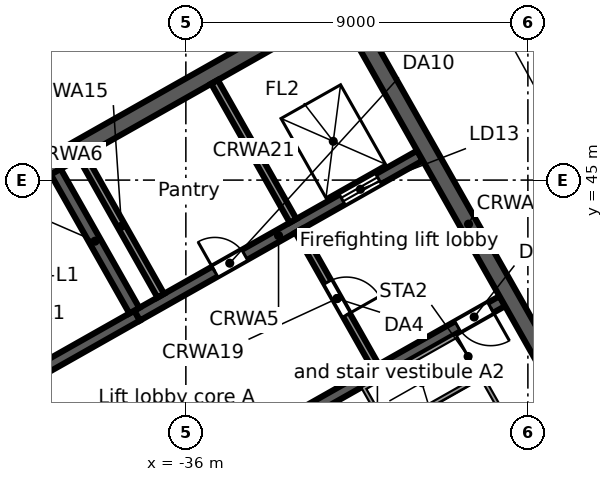
"""IFC4 building model, lengths in metres.
Left out: names, types, materials, properties, quantities, classifications, styles, units other than length and angle.
Written with IfcOpenShell. Run it as: python <this file> out.ifc"""

import sys

from ifc_helpers import new_model, si_unit, direction, frame, frame_2d, origin, place, context, subcontext, project, spatial, rectangle, extrude, element, fill, save


model = new_model("IFC4")
c1 = context("Model", 3, precision=1e-05, world=origin(), true_north=direction((0.0, 1.0)))
c2 = subcontext(c1, "Body", "Model", "MODEL_VIEW")
j1 = project(units=[si_unit("LENGTHUNIT", "METRE"), si_unit("PLANEANGLEUNIT", "RADIAN")], contexts=[c1])
p1 = place(None, origin())
s1 = spatial("IfcSite", under=j1, at=p1, CompositionType="ELEMENT")
p2 = place(p1, origin())
s2 = spatial("IfcBuilding", under=s1, at=p2, CompositionType="ELEMENT")
p3 = place(p2, frame((0.0, 0.0, 254.3)))
s3 = spatial("IfcBuildingStorey", under=s2, at=p3, CompositionType="ELEMENT", Elevation=254.3)
p4 = place(p3, frame((-0.046, 47.974, 0.0), z_axis=(0.0, 0.0, 1.0), x_axis=(-0.870356579543, -0.492421998337, 0.0)))
e1 = element("IfcWall", 1, at=p4, inside=s3, PredefinedType="STANDARD", context=c2, shape_type="SweptSolid", body=[
    extrude(rectangle(XDim=43.754, YDim=0.25, at=frame_2d((21.877, 0.0))), origin(), (0.0, 0.0, 1.0), 3.55),
])
p5 = place(p4, frame((41.061, 0.0, 0.8)))
e2 = element("IfcOpeningElement", 2, at=p5, cuts=e1, PredefinedType="OPENING", context=c2, shape_type="SweptSolid", body=[
    extrude(rectangle(XDim=2.4, YDim=2.2, at=frame_2d((1.2, 1.1))), frame((0.0, 0.135, 0.0), z_axis=(0.0, -1.0, 0.0), x_axis=(1.0, 0.0, 0.0)), (0.0, 0.0, 1.0), 0.27),
])
p6 = place(p4, frame((38.443, 0.0, 0.0)))
e3 = element("IfcOpeningElement", 3, at=p6, cuts=e1, PredefinedType="OPENING", context=c2, shape_type="SweptSolid", body=[
    extrude(rectangle(XDim=1.8, YDim=2.4, at=frame_2d((0.9, 1.2))), frame((0.0, 0.135, 0.0), z_axis=(0.0, -1.0, 0.0), x_axis=(1.0, 0.0, 0.0)), (0.0, 0.0, 1.0), 0.27),
])
p7 = place(p4, frame((35.225, 0.0, 0.8)))
e4 = element("IfcOpeningElement", 4, at=p7, cuts=e1, PredefinedType="OPENING", context=c2, shape_type="SweptSolid", body=[
    extrude(rectangle(XDim=2.4, YDim=2.2, at=frame_2d((1.2, 1.1))), frame((0.0, 0.135, 0.0), z_axis=(0.0, -1.0, 0.0), x_axis=(1.0, 0.0, 0.0)), (0.0, 0.0, 1.0), 0.27),
])
p8 = place(p4, frame((32.307, 0.0, 0.8)))
e5 = element("IfcOpeningElement", 5, at=p8, cuts=e1, PredefinedType="OPENING", context=c2, shape_type="SweptSolid", body=[
    extrude(rectangle(XDim=2.4, YDim=2.2, at=frame_2d((1.2, 1.1))), frame((0.0, 0.135, 0.0), z_axis=(0.0, -1.0, 0.0), x_axis=(1.0, 0.0, 0.0)), (0.0, 0.0, 1.0), 0.27),
])
p9 = place(p4, frame((29.688, 0.0, 0.0)))
e6 = element("IfcOpeningElement", 6, at=p9, cuts=e1, PredefinedType="OPENING", context=c2, shape_type="SweptSolid", body=[
    extrude(rectangle(XDim=1.8, YDim=2.4, at=frame_2d((0.9, 1.2))), frame((0.0, 0.135, 0.0), z_axis=(0.0, -1.0, 0.0), x_axis=(1.0, 0.0, 0.0)), (0.0, 0.0, 1.0), 0.27),
])
p10 = place(p4, frame((26.47, 0.0, 0.8)))
e7 = element("IfcOpeningElement", 7, at=p10, cuts=e1, PredefinedType="OPENING", context=c2, shape_type="SweptSolid", body=[
    extrude(rectangle(XDim=2.4, YDim=2.2, at=frame_2d((1.2, 1.1))), frame((0.0, 0.135, 0.0), z_axis=(0.0, -1.0, 0.0), x_axis=(1.0, 0.0, 0.0)), (0.0, 0.0, 1.0), 0.27),
])
p11 = place(p4, frame((23.552, 0.0, 0.8)))
e8 = element("IfcOpeningElement", 8, at=p11, cuts=e1, PredefinedType="OPENING", context=c2, shape_type="SweptSolid", body=[
    extrude(rectangle(XDim=2.4, YDim=2.2, at=frame_2d((1.2, 1.1))), frame((0.0, 0.135, 0.0), z_axis=(0.0, -1.0, 0.0), x_axis=(1.0, 0.0, 0.0)), (0.0, 0.0, 1.0), 0.27),
])
p12 = place(p4, frame((20.934, 0.0, 0.0)))
e9 = element("IfcOpeningElement", 9, at=p12, cuts=e1, PredefinedType="OPENING", context=c2, shape_type="SweptSolid", body=[
    extrude(rectangle(XDim=1.8, YDim=2.4, at=frame_2d((0.9, 1.2))), frame((0.0, 0.135, 0.0), z_axis=(0.0, -1.0, 0.0), x_axis=(1.0, 0.0, 0.0)), (0.0, 0.0, 1.0), 0.27),
])
p13 = place(p4, frame((17.716, 0.0, 0.8)))
e10 = element("IfcOpeningElement", 10, at=p13, cuts=e1, PredefinedType="OPENING", context=c2, shape_type="SweptSolid", body=[
    extrude(rectangle(XDim=2.4, YDim=2.2, at=frame_2d((1.2, 1.1))), frame((0.0, 0.135, 0.0), z_axis=(0.0, -1.0, 0.0), x_axis=(1.0, 0.0, 0.0)), (0.0, 0.0, 1.0), 0.27),
])
p14 = place(p4, frame((14.798, 0.0, 0.8)))
e11 = element("IfcOpeningElement", 11, at=p14, cuts=e1, PredefinedType="OPENING", context=c2, shape_type="SweptSolid", body=[
    extrude(rectangle(XDim=2.4, YDim=2.2, at=frame_2d((1.2, 1.1))), frame((0.0, 0.135, 0.0), z_axis=(0.0, -1.0, 0.0), x_axis=(1.0, 0.0, 0.0)), (0.0, 0.0, 1.0), 0.27),
])
p15 = place(p4, frame((12.179, 0.0, 0.0)))
e12 = element("IfcOpeningElement", 12, at=p15, cuts=e1, PredefinedType="OPENING", context=c2, shape_type="SweptSolid", body=[
    extrude(rectangle(XDim=1.8, YDim=2.4, at=frame_2d((0.9, 1.2))), frame((0.0, 0.135, 0.0), z_axis=(0.0, -1.0, 0.0), x_axis=(1.0, 0.0, 0.0)), (0.0, 0.0, 1.0), 0.27),
])
p16 = place(p4, frame((8.961, 0.0, 0.8)))
e13 = element("IfcOpeningElement", 13, at=p16, cuts=e1, PredefinedType="OPENING", context=c2, shape_type="SweptSolid", body=[
    extrude(rectangle(XDim=2.4, YDim=2.2, at=frame_2d((1.2, 1.1))), frame((0.0, 0.135, 0.0), z_axis=(0.0, -1.0, 0.0), x_axis=(1.0, 0.0, 0.0)), (0.0, 0.0, 1.0), 0.27),
])
p17 = place(p4, frame((6.043, 0.0, 0.8)))
e14 = element("IfcOpeningElement", 14, at=p17, cuts=e1, PredefinedType="OPENING", context=c2, shape_type="SweptSolid", body=[
    extrude(rectangle(XDim=2.4, YDim=2.2, at=frame_2d((1.2, 1.1))), frame((0.0, 0.135, 0.0), z_axis=(0.0, -1.0, 0.0), x_axis=(1.0, 0.0, 0.0)), (0.0, 0.0, 1.0), 0.27),
])
p18 = place(p4, frame((3.425, 0.0, 0.0)))
e15 = element("IfcOpeningElement", 15, at=p18, cuts=e1, PredefinedType="OPENING", context=c2, shape_type="SweptSolid", body=[
    extrude(rectangle(XDim=1.8, YDim=2.4, at=frame_2d((0.9, 1.2))), frame((0.0, 0.135, 0.0), z_axis=(0.0, -1.0, 0.0), x_axis=(1.0, 0.0, 0.0)), (0.0, 0.0, 1.0), 0.27),
])
p19 = place(p4, frame((0.207, 0.0, 0.8)))
e16 = element("IfcOpeningElement", 16, at=p19, cuts=e1, PredefinedType="OPENING", context=c2, shape_type="SweptSolid", body=[
    extrude(rectangle(XDim=2.4, YDim=2.2, at=frame_2d((1.2, 1.1))), frame((0.0, 0.135, 0.0), z_axis=(0.0, -1.0, 0.0), x_axis=(1.0, 0.0, 0.0)), (0.0, 0.0, 1.0), 0.27),
])
p20 = place(p3, frame((-58.732, 38.771, 0.0), z_axis=(0.0, 0.0, 1.0), x_axis=(0.870354824205, 0.492425100887, 0.0)))
e17 = element("IfcWall", 17, at=p20, inside=s3, PredefinedType="STANDARD", context=c2, shape_type="SweptSolid", body=[
    extrude(rectangle(XDim=64.006, YDim=0.25, at=frame_2d((32.003, 0.0))), origin(), (0.0, 0.0, 1.0), 3.55),
])
p21 = place(p20, frame((61.259, 0.0, 0.8)))
e18 = element("IfcOpeningElement", 18, at=p21, cuts=e17, PredefinedType="OPENING", context=c2, shape_type="SweptSolid", body=[
    extrude(rectangle(XDim=2.4, YDim=2.2, at=frame_2d((1.2, 1.1))), frame((0.0, 0.135, 0.0), z_axis=(0.0, -1.0, 0.0), x_axis=(1.0, 0.0, 0.0)), (0.0, 0.0, 1.0), 0.27),
])
p22 = place(p20, frame((58.216, 0.0, 0.8)))
e19 = element("IfcOpeningElement", 19, at=p22, cuts=e17, PredefinedType="OPENING", context=c2, shape_type="SweptSolid", body=[
    extrude(rectangle(XDim=2.4, YDim=2.2, at=frame_2d((1.2, 1.1))), frame((0.0, 0.135, 0.0), z_axis=(0.0, -1.0, 0.0), x_axis=(1.0, 0.0, 0.0)), (0.0, 0.0, 1.0), 0.27),
])
p23 = place(p20, frame((55.173, 0.0, 0.8)))
e20 = element("IfcOpeningElement", 20, at=p23, cuts=e17, PredefinedType="OPENING", context=c2, shape_type="SweptSolid", body=[
    extrude(rectangle(XDim=2.4, YDim=2.2, at=frame_2d((1.2, 1.1))), frame((0.0, 0.135, 0.0), z_axis=(0.0, -1.0, 0.0), x_axis=(1.0, 0.0, 0.0)), (0.0, 0.0, 1.0), 0.27),
])
p24 = place(p20, frame((52.129, 0.0, 0.8)))
e21 = element("IfcOpeningElement", 21, at=p24, cuts=e17, PredefinedType="OPENING", context=c2, shape_type="SweptSolid", body=[
    extrude(rectangle(XDim=2.4, YDim=2.2, at=frame_2d((1.2, 1.1))), frame((0.0, 0.135, 0.0), z_axis=(0.0, -1.0, 0.0), x_axis=(1.0, 0.0, 0.0)), (0.0, 0.0, 1.0), 0.27),
])
p25 = place(p20, frame((49.086, 0.0, 0.8)))
e22 = element("IfcOpeningElement", 22, at=p25, cuts=e17, PredefinedType="OPENING", context=c2, shape_type="SweptSolid", body=[
    extrude(rectangle(XDim=2.4, YDim=2.2, at=frame_2d((1.2, 1.1))), frame((0.0, 0.135, 0.0), z_axis=(0.0, -1.0, 0.0), x_axis=(1.0, 0.0, 0.0)), (0.0, 0.0, 1.0), 0.27),
])
p26 = place(p20, frame((46.043, 0.0, 0.8)))
e23 = element("IfcOpeningElement", 23, at=p26, cuts=e17, PredefinedType="OPENING", context=c2, shape_type="SweptSolid", body=[
    extrude(rectangle(XDim=2.4, YDim=2.2, at=frame_2d((1.2, 1.1))), frame((0.0, 0.135, 0.0), z_axis=(0.0, -1.0, 0.0), x_axis=(1.0, 0.0, 0.0)), (0.0, 0.0, 1.0), 0.27),
])
p27 = place(p20, frame((43.0, 0.0, 0.8)))
e24 = element("IfcOpeningElement", 24, at=p27, cuts=e17, PredefinedType="OPENING", context=c2, shape_type="SweptSolid", body=[
    extrude(rectangle(XDim=2.4, YDim=2.2, at=frame_2d((1.2, 1.1))), frame((0.0, 0.135, 0.0), z_axis=(0.0, -1.0, 0.0), x_axis=(1.0, 0.0, 0.0)), (0.0, 0.0, 1.0), 0.27),
])
p28 = place(p20, frame((39.956, 0.0, 0.8)))
e25 = element("IfcOpeningElement", 25, at=p28, cuts=e17, PredefinedType="OPENING", context=c2, shape_type="SweptSolid", body=[
    extrude(rectangle(XDim=2.4, YDim=2.2, at=frame_2d((1.2, 1.1))), frame((0.0, 0.135, 0.0), z_axis=(0.0, -1.0, 0.0), x_axis=(1.0, 0.0, 0.0)), (0.0, 0.0, 1.0), 0.27),
])
p29 = place(p20, frame((36.913, 0.0, 0.8)))
e26 = element("IfcOpeningElement", 26, at=p29, cuts=e17, PredefinedType="OPENING", context=c2, shape_type="SweptSolid", body=[
    extrude(rectangle(XDim=2.4, YDim=2.2, at=frame_2d((1.2, 1.1))), frame((0.0, 0.135, 0.0), z_axis=(0.0, -1.0, 0.0), x_axis=(1.0, 0.0, 0.0)), (0.0, 0.0, 1.0), 0.27),
])
p30 = place(p20, frame((33.87, 0.0, 0.8)))
e27 = element("IfcOpeningElement", 27, at=p30, cuts=e17, PredefinedType="OPENING", context=c2, shape_type="SweptSolid", body=[
    extrude(rectangle(XDim=2.4, YDim=2.2, at=frame_2d((1.2, 1.1))), frame((0.0, 0.135, 0.0), z_axis=(0.0, -1.0, 0.0), x_axis=(1.0, 0.0, 0.0)), (0.0, 0.0, 1.0), 0.27),
])
p31 = place(p20, frame((30.826, 0.0, 0.8)))
e28 = element("IfcOpeningElement", 28, at=p31, cuts=e17, PredefinedType="OPENING", context=c2, shape_type="SweptSolid", body=[
    extrude(rectangle(XDim=2.4, YDim=2.2, at=frame_2d((1.2, 1.1))), frame((0.0, 0.135, 0.0), z_axis=(0.0, -1.0, 0.0), x_axis=(1.0, 0.0, 0.0)), (0.0, 0.0, 1.0), 0.27),
])
p32 = place(p20, frame((27.783, 0.0, 0.8)))
e29 = element("IfcOpeningElement", 29, at=p32, cuts=e17, PredefinedType="OPENING", context=c2, shape_type="SweptSolid", body=[
    extrude(rectangle(XDim=2.4, YDim=2.2, at=frame_2d((1.2, 1.1))), frame((0.0, 0.135, 0.0), z_axis=(0.0, -1.0, 0.0), x_axis=(1.0, 0.0, 0.0)), (0.0, 0.0, 1.0), 0.27),
])
p33 = place(p20, frame((24.74, 0.0, 0.8)))
e30 = element("IfcOpeningElement", 30, at=p33, cuts=e17, PredefinedType="OPENING", context=c2, shape_type="SweptSolid", body=[
    extrude(rectangle(XDim=2.4, YDim=2.2, at=frame_2d((1.2, 1.1))), frame((0.0, 0.135, 0.0), z_axis=(0.0, -1.0, 0.0), x_axis=(1.0, 0.0, 0.0)), (0.0, 0.0, 1.0), 0.27),
])
p34 = place(p20, frame((21.696, 0.0, 0.8)))
e31 = element("IfcOpeningElement", 31, at=p34, cuts=e17, PredefinedType="OPENING", context=c2, shape_type="SweptSolid", body=[
    extrude(rectangle(XDim=2.4, YDim=2.2, at=frame_2d((1.2, 1.1))), frame((0.0, 0.135, 0.0), z_axis=(0.0, -1.0, 0.0), x_axis=(1.0, 0.0, 0.0)), (0.0, 0.0, 1.0), 0.27),
])
p35 = place(p20, frame((18.653, 0.0, 0.8)))
e32 = element("IfcOpeningElement", 32, at=p35, cuts=e17, PredefinedType="OPENING", context=c2, shape_type="SweptSolid", body=[
    extrude(rectangle(XDim=2.4, YDim=2.2, at=frame_2d((1.2, 1.1))), frame((0.0, 0.135, 0.0), z_axis=(0.0, -1.0, 0.0), x_axis=(1.0, 0.0, 0.0)), (0.0, 0.0, 1.0), 0.27),
])
p36 = place(p20, frame((15.61, 0.0, 0.8)))
e33 = element("IfcOpeningElement", 33, at=p36, cuts=e17, PredefinedType="OPENING", context=c2, shape_type="SweptSolid", body=[
    extrude(rectangle(XDim=2.4, YDim=2.2, at=frame_2d((1.2, 1.1))), frame((0.0, 0.135, 0.0), z_axis=(0.0, -1.0, 0.0), x_axis=(1.0, 0.0, 0.0)), (0.0, 0.0, 1.0), 0.27),
])
p37 = place(p20, frame((12.567, 0.0, 0.8)))
e34 = element("IfcOpeningElement", 34, at=p37, cuts=e17, PredefinedType="OPENING", context=c2, shape_type="SweptSolid", body=[
    extrude(rectangle(XDim=2.4, YDim=2.2, at=frame_2d((1.2, 1.1))), frame((0.0, 0.135, 0.0), z_axis=(0.0, -1.0, 0.0), x_axis=(1.0, 0.0, 0.0)), (0.0, 0.0, 1.0), 0.27),
])
p38 = place(p20, frame((9.523, 0.0, 0.8)))
e35 = element("IfcOpeningElement", 35, at=p38, cuts=e17, PredefinedType="OPENING", context=c2, shape_type="SweptSolid", body=[
    extrude(rectangle(XDim=2.4, YDim=2.2, at=frame_2d((1.2, 1.1))), frame((0.0, 0.135, 0.0), z_axis=(0.0, -1.0, 0.0), x_axis=(1.0, 0.0, 0.0)), (0.0, 0.0, 1.0), 0.27),
])
p39 = place(p20, frame((6.48, 0.0, 0.8)))
e36 = element("IfcOpeningElement", 36, at=p39, cuts=e17, PredefinedType="OPENING", context=c2, shape_type="SweptSolid", body=[
    extrude(rectangle(XDim=2.4, YDim=2.2, at=frame_2d((1.2, 1.1))), frame((0.0, 0.135, 0.0), z_axis=(0.0, -1.0, 0.0), x_axis=(1.0, 0.0, 0.0)), (0.0, 0.0, 1.0), 0.27),
])
p40 = place(p20, frame((3.437, 0.0, 0.8)))
e37 = element("IfcOpeningElement", 37, at=p40, cuts=e17, PredefinedType="OPENING", context=c2, shape_type="SweptSolid", body=[
    extrude(rectangle(XDim=2.4, YDim=2.2, at=frame_2d((1.2, 1.1))), frame((0.0, 0.135, 0.0), z_axis=(0.0, -1.0, 0.0), x_axis=(1.0, 0.0, 0.0)), (0.0, 0.0, 1.0), 0.27),
])
p41 = place(p20, frame((0.393, 0.0, 0.8)))
e38 = element("IfcOpeningElement", 38, at=p41, cuts=e17, PredefinedType="OPENING", context=c2, shape_type="SweptSolid", body=[
    extrude(rectangle(XDim=2.4, YDim=2.2, at=frame_2d((1.2, 1.1))), frame((0.0, 0.135, 0.0), z_axis=(0.0, -1.0, 0.0), x_axis=(1.0, 0.0, 0.0)), (0.0, 0.0, 1.0), 0.27),
])
p42 = place(p3, frame((-34.245, 38.097, 0.0), z_axis=(0.0, 0.0, 1.0), x_axis=(0.870360409231, 0.492415229297, 0.0)))
e39 = element("IfcWall", 39, at=p42, inside=s3, PredefinedType="SOLIDWALL", context=c2, shape_type="SweptSolid", body=[
    extrude(rectangle(XDim=7.55, YDim=0.3, at=frame_2d((3.775, 0.0))), origin(), (0.0, 0.0, 1.0), 3.55),
])
p43 = place(p42, frame((6.2, 0.0, 0.0)))
e40 = element("IfcOpeningElement", 40, at=p43, cuts=e39, PredefinedType="OPENING", context=c2, shape_type="SweptSolid", body=[
    extrude(rectangle(XDim=1.0, YDim=2.1, at=frame_2d((0.5, 1.05))), frame((0.0, 0.16, 0.0), z_axis=(0.0, -1.0, 0.0), x_axis=(1.0, 0.0, 0.0)), (0.0, 0.0, 1.0), 0.32),
])
p44 = place(p3, frame((-43.853, 37.717, 0.0), z_axis=(0.0, 0.0, 1.0), x_axis=(0.870360409231, 0.492415229297, 0.0)))
e41 = element("IfcWall", 41, at=p44, inside=s3, PredefinedType="SOLIDWALL", context=c2, shape_type="SweptSolid", body=[
    extrude(rectangle(XDim=7.55, YDim=0.3, at=frame_2d((3.775, 0.0))), origin(), (0.0, 0.0, 1.0), 3.55),
])
p45 = place(p44, frame((0.35, 0.0, 0.0)))
e42 = element("IfcOpeningElement", 42, at=p45, cuts=e41, PredefinedType="OPENING", context=c2, shape_type="SweptSolid", body=[
    extrude(rectangle(XDim=1.0, YDim=2.1, at=frame_2d((0.5, 1.05))), frame((0.0, 0.16, 0.0), z_axis=(0.0, -1.0, 0.0), x_axis=(1.0, 0.0, 0.0)), (0.0, 0.0, 1.0), 0.32),
])
p46 = place(p3, frame((-37.282, 41.435, 0.0), z_axis=(0.0, 0.0, 1.0), x_axis=(0.870352688754, 0.492428875248, 0.0)))
e43 = element("IfcWall", 43, at=p46, inside=s3, PredefinedType="SOLIDWALL", context=c2, shape_type="SweptSolid", body=[
    extrude(rectangle(XDim=8.55, YDim=0.3, at=frame_2d((4.275, 0.0))), origin(), (0.0, 0.0, 1.0), 3.55),
])
p47 = place(p46, frame((6.2, 0.0, 0.0)))
e44 = element("IfcOpeningElement", 44, at=p47, cuts=e43, PredefinedType="OPENING", context=c2, shape_type="SweptSolid", body=[
    extrude(rectangle(XDim=1.1, YDim=2.1, at=frame_2d((0.55, 1.05))), frame((0.0, 0.16, 0.0), z_axis=(0.0, -1.0, 0.0), x_axis=(1.0, 0.0, 0.0)), (0.0, 0.0, 1.0), 0.32),
])
p48 = place(p46, frame((2.35, 0.0, 0.0)))
e45 = element("IfcOpeningElement", 45, at=p48, cuts=e43, PredefinedType="OPENING", context=c2, shape_type="SweptSolid", body=[
    extrude(rectangle(XDim=0.9, YDim=2.1, at=frame_2d((0.45, 1.05))), frame((0.0, 0.16, 0.0), z_axis=(0.0, -1.0, 0.0), x_axis=(1.0, 0.0, 0.0)), (0.0, 0.0, 1.0), 0.32),
])
p49 = place(p3, frame((-46.498, 41.477, 0.0), z_axis=(0.0, 0.0, 1.0), x_axis=(0.870359753402, 0.492416388494, 0.0)))
e46 = element("IfcWall", 46, at=p49, inside=s3, PredefinedType="SOLIDWALL", context=c2, shape_type="SweptSolid", body=[
    extrude(rectangle(XDim=17.0, YDim=0.45, at=frame_2d((8.5, 0.0))), origin(), (0.0, 0.0, 1.0), 3.55),
])
p50 = place(p3, frame((-40.516, 39.433, 0.0), z_axis=(0.0, 0.0, 1.0), x_axis=(0.492453559952, -0.87033872216, 0.0)))
e47 = element("IfcWall", 47, at=p50, inside=s3, PredefinedType="PARTITIONING", context=c2, shape_type="SweptSolid", body=[
    extrude(rectangle(XDim=4.1, YDim=0.2, at=frame_2d((2.05, 0.0))), origin(), (0.0, 0.0, 1.0), 3.55),
])
p51 = place(p50, frame((1.55, 0.0, 0.0)))
e48 = element("IfcOpeningElement", 48, at=p51, cuts=e47, PredefinedType="OPENING", context=c2, shape_type="SweptSolid", body=[
    extrude(rectangle(XDim=1.0, YDim=2.1, at=frame_2d((0.5, 1.05))), frame((0.0, 0.11, 0.0), z_axis=(0.0, -1.0, 0.0), x_axis=(1.0, 0.0, 0.0)), (0.0, 0.0, 1.0), 0.22),
])
p52 = place(p3, frame((-39.424, 45.22, 0.0), z_axis=(0.0, 0.0, 1.0), x_axis=(0.492409653846, -0.870363563575, 0.0)))
e49 = element("IfcWall", 49, at=p52, inside=s3, PredefinedType="SOLIDWALL", context=c2, shape_type="SweptSolid", body=[
    extrude(rectangle(XDim=4.2, YDim=0.3, at=frame_2d((2.1, 0.0))), origin(), (0.0, 0.0, 1.0), 3.55),
])
p53 = place(p3, frame((-38.728, 45.615, 0.0), z_axis=(0.0, 0.0, 1.0), x_axis=(0.492409653846, -0.870363563575, 0.0)))
e50 = element("IfcWall", 50, at=p53, inside=s3, PredefinedType="SOLIDWALL", context=c2, shape_type="SweptSolid", body=[
    extrude(rectangle(XDim=4.2, YDim=0.2, at=frame_2d((2.1, 0.0))), origin(), (0.0, 0.0, 1.0), 3.55),
])
p54 = place(p3, frame((-33.031, 43.667, 0.0), z_axis=(0.0, 0.0, 1.0), x_axis=(0.492408451753, -0.87036424366, 0.0)))
e51 = element("IfcWall", 51, at=p54, inside=s3, PredefinedType="PARTITIONING", context=c2, shape_type="SweptSolid", body=[
    extrude(rectangle(XDim=4.1, YDim=0.2, at=frame_2d((2.05, 0.0))), origin(), (0.0, 0.0, 1.0), 3.55),
])
p55 = place(p54, frame((1.55, 0.0, 0.0)))
e52 = element("IfcOpeningElement", 52, at=p55, cuts=e51, PredefinedType="OPENING", context=c2, shape_type="SweptSolid", body=[
    extrude(rectangle(XDim=1.0, YDim=2.1, at=frame_2d((0.5, 1.05))), frame((0.0, 0.11, 0.0), z_axis=(0.0, -1.0, 0.0), x_axis=(1.0, 0.0, 0.0)), (0.0, 0.0, 1.0), 0.22),
])
p56 = place(p3, frame((-35.246, 47.584, 0.0), z_axis=(0.0, 0.0, 1.0), x_axis=(0.492409653846, -0.870363563575, 0.0)))
e53 = element("IfcWall", 53, at=p56, inside=s3, PredefinedType="SOLIDWALL", context=c2, shape_type="SweptSolid", body=[
    extrude(rectangle(XDim=4.2, YDim=0.2, at=frame_2d((2.1, 0.0))), origin(), (0.0, 0.0, 1.0), 3.55),
])
p57 = place(p3, frame((-31.787, 49.542, 0.0), z_axis=(0.0, 0.0, 1.0), x_axis=(0.492421378713, -0.870356930107, 0.0)))
e54 = element("IfcWall", 54, at=p57, inside=s3, PredefinedType="SOLIDWALL", context=c2, shape_type="SweptSolid", body=[
    extrude(rectangle(XDim=13.1, YDim=0.45, at=frame_2d((6.55, 0.0))), origin(), (0.0, 0.0, 1.0), 3.55),
])
p58 = place(p47, origin())
e55 = element("IfcDoor", 55, at=p58, inside=s3, OperationType="DOUBLE_DOOR_SLIDING", PredefinedType="DOOR", context=c2, shape_type="SweptSolid", body=[
    extrude(rectangle(XDim=1.1, YDim=2.1, at=frame_2d((0.55, 1.05))), frame((0.0, 0.025, 0.0), z_axis=(0.0, -1.0, 0.0), x_axis=(1.0, 0.0, 0.0)), (0.0, 0.0, 1.0), 0.05),
])
fill(e44, e55)
p59 = place(p43, frame((1.0, 0.0, 0.0), z_axis=(0.0, 0.0, 1.0), x_axis=(-1.0, 0.0, 0.0)))
e56 = element("IfcDoor", 56, at=p59, inside=s3, OperationType="SINGLE_SWING_LEFT", PredefinedType="DOOR", context=c2, shape_type="SweptSolid", body=[
    extrude(rectangle(XDim=1.0, YDim=2.1, at=frame_2d((0.5, 1.05))), frame((0.0, 0.025, 0.0), z_axis=(0.0, -1.0, 0.0), x_axis=(1.0, 0.0, 0.0)), (0.0, 0.0, 1.0), 0.05),
])
fill(e40, e56)
p60 = place(p55, origin())
e57 = element("IfcDoor", 57, at=p60, inside=s3, OperationType="SINGLE_SWING_RIGHT", PredefinedType="DOOR", context=c2, shape_type="SweptSolid", body=[
    extrude(rectangle(XDim=1.0, YDim=2.1, at=frame_2d((0.5, 1.05))), frame((0.0, 0.025, 0.0), z_axis=(0.0, -1.0, 0.0), x_axis=(1.0, 0.0, 0.0)), (0.0, 0.0, 1.0), 0.05),
])
fill(e52, e57)
p61 = place(p48, origin())
e58 = element("IfcDoor", 58, at=p61, inside=s3, OperationType="SINGLE_SWING_LEFT", PredefinedType="DOOR", context=c2, shape_type="SweptSolid", body=[
    extrude(rectangle(XDim=0.9, YDim=2.1, at=frame_2d((0.45, 1.05))), frame((0.0, 0.025, 0.0), z_axis=(0.0, -1.0, 0.0), x_axis=(1.0, 0.0, 0.0)), (0.0, 0.0, 1.0), 0.05),
])
fill(e45, e58)
save(model, sys.argv[1])
